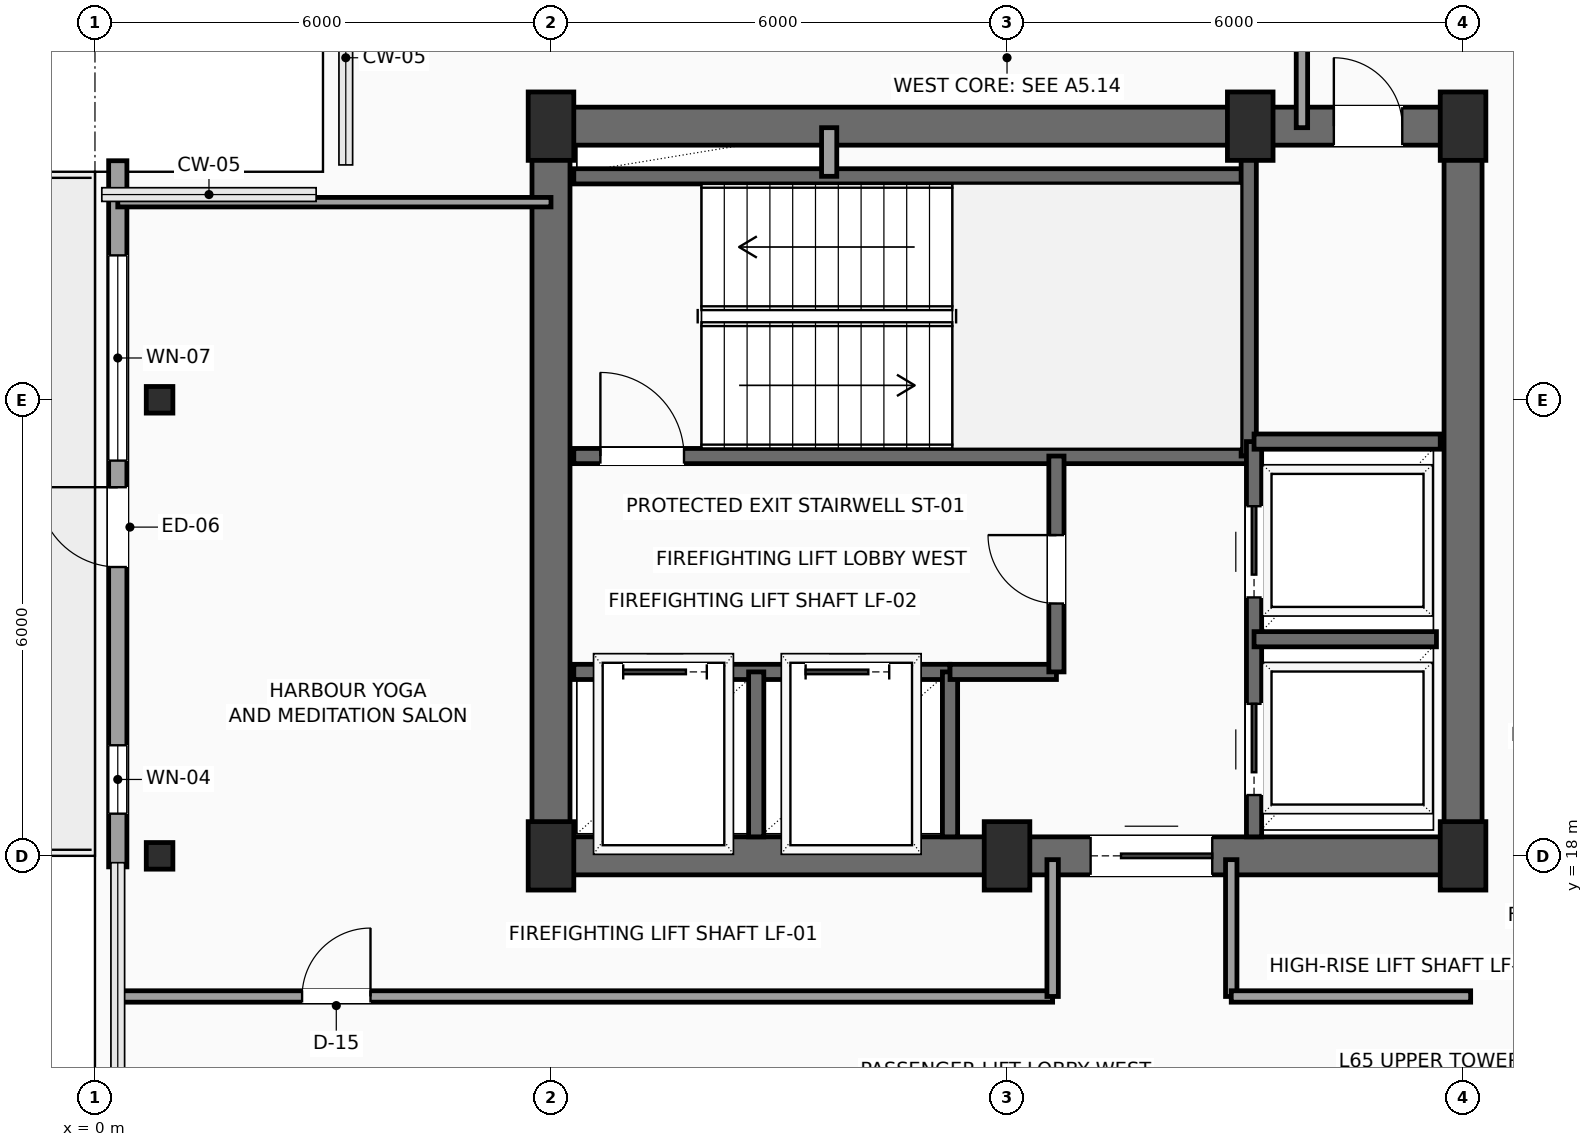
"""IFC4 building model, lengths in metres.
Left out: names, types, materials, properties, quantities, classifications, styles, units other than length and angle.
Written with IfcOpenShell. Run it as: python <this file> out.ifc"""

import sys

from ifc_helpers import new_model, si_unit, direction, frame, frame_2d, origin, origin_2d, place, context, subcontext, project, spatial, rectangle, hollow_rectangle, extrude, element, fill, save


model = new_model("IFC4")
c1 = context("Model", 3, precision=1e-05, world=origin(), true_north=direction((0.0, 1.0)))
c2 = subcontext(c1, "Body", "Model", "MODEL_VIEW")
j1 = project(units=[si_unit("LENGTHUNIT", "METRE"), si_unit("PLANEANGLEUNIT", "RADIAN")], contexts=[c1])
p1 = place(None, origin())
s1 = spatial("IfcSite", under=j1, at=p1, CompositionType="ELEMENT")
p2 = place(p1, origin())
s2 = spatial("IfcBuilding", under=s1, at=p2, CompositionType="ELEMENT")
p3 = place(p2, frame((0.0, 0.0, 260.7)))
s3 = spatial("IfcBuildingStorey", under=s2, at=p3, CompositionType="ELEMENT", Elevation=260.7)
for number, where, z_axis, x_axis in (
    (1, (6.0, 18.0, 0.0), (0.0, 0.0, 1.0), (1.0, 0.0, 0.0)),
    (2, (12.0, 18.0, 0.0), (0.0, 0.0, 1.0), (1.0, 0.0, 0.0)),
    (3, (18.0, 18.0, 0.0), (0.0, 0.0, 1.0), (1.0, 0.0, 0.0)),
    (4, (6.0, 27.6, 0.0), (0.0, 0.0, 1.0), (1.0, 0.0, 0.0)),
    (5, (15.2, 27.6, 0.0), (0.0, 0.0, 1.0), (1.0, 0.0, 0.0)),
    (6, (18.0, 27.6, 0.0), (0.0, 0.0, 1.0), (1.0, 0.0, 0.0)),
):
    element("IfcColumn", number, at=place(p3, frame(where, z_axis=z_axis, x_axis=x_axis)), inside=s3, PredefinedType="COLUMN", context=c2, shape_type="SweptSolid", body=[
        extrude(rectangle(XDim=0.6, YDim=0.9, at=origin_2d()), origin(), (0.0, 0.0, 1.0), 3.5),
    ])
for number, where, z_axis, x_axis in (
    (7, (0.85, 18.0, 0.0), (0.0, 0.0, 1.0), (1.0, 0.0, 0.0)),
    (8, (0.85, 24.0, 0.0), (0.0, 0.0, 1.0), (1.0, 0.0, 0.0)),
):
    element("IfcColumn", number, at=place(p3, frame(where, z_axis=z_axis, x_axis=x_axis)), inside=s3, PredefinedType="COLUMN", context=c2, shape_type="SweptSolid", body=[
        extrude(hollow_rectangle(XDim=0.35, YDim=0.35, WallThickness=0.016, InnerFilletRadius=0.016, OuterFilletRadius=0.032, at=origin_2d()), origin(), (0.0, 0.0, 1.0), 3.5),
    ])
p4 = place(p3, frame((0.3, 17.855, 0.0), z_axis=(0.0, 0.0, 1.0), x_axis=(0.0, 1.0, 0.0)))
e9 = element("IfcWall", 9, at=p4, inside=s3, PredefinedType="SOLIDWALL", context=c2, shape_type="SweptSolid", body=[
    extrude(rectangle(XDim=9.29, YDim=0.24, at=frame_2d((4.645, 0.0))), origin(), (0.0, 0.0, 1.0), 3.3),
])
p5 = place(p4, frame((3.945, 0.0, 0.0)))
e10 = element("IfcOpeningElement", 10, at=p5, cuts=e9, PredefinedType="OPENING", context=c2, shape_type="SweptSolid", body=[
    extrude(rectangle(XDim=1.05, YDim=2.2, at=frame_2d((0.525, 1.1))), frame((0.0, 0.13, 0.0), z_axis=(0.0, -1.0, 0.0), x_axis=(1.0, 0.0, 0.0)), (0.0, 0.0, 1.0), 0.26),
])
p6 = place(p4, frame((5.345, 0.0, 0.6)))
e11 = element("IfcOpeningElement", 11, at=p6, cuts=e9, PredefinedType="OPENING", context=c2, shape_type="SweptSolid", body=[
    extrude(rectangle(XDim=2.7, YDim=2.3, at=frame_2d((1.35, 1.15))), frame((0.0, 0.13, 0.0), z_axis=(0.0, -1.0, 0.0), x_axis=(1.0, 0.0, 0.0)), (0.0, 0.0, 1.0), 0.26),
])
p7 = place(p4, frame((0.7, 0.0, 0.6)))
e12 = element("IfcOpeningElement", 12, at=p7, cuts=e9, PredefinedType="OPENING", context=c2, shape_type="SweptSolid", body=[
    extrude(rectangle(XDim=0.9, YDim=2.2, at=frame_2d((0.45, 1.1))), frame((0.0, 0.13, 0.0), z_axis=(0.0, -1.0, 0.0), x_axis=(1.0, 0.0, 0.0)), (0.0, 0.0, 1.0), 0.26),
])
p8 = place(p3, frame((6.0, 18.0, 0.0), z_axis=(0.0, 0.0, 1.0), x_axis=(1.0, 0.0, 0.0)))
e13 = element("IfcWall", 13, at=p8, inside=s3, PredefinedType="SHEAR", context=c2, shape_type="SweptSolid", body=[
    extrude(rectangle(XDim=12.0, YDim=0.5, at=frame_2d((6.0, 0.0))), origin(), (0.0, 0.0, 1.0), 3.3),
])
p9 = place(p8, frame((7.1, 0.0, 0.0)))
e14 = element("IfcOpeningElement", 14, at=p9, cuts=e13, PredefinedType="OPENING", context=c2, shape_type="SweptSolid", body=[
    extrude(rectangle(XDim=1.6, YDim=2.3, at=frame_2d((0.8, 1.15))), frame((0.0, 0.26, 0.0), z_axis=(0.0, -1.0, 0.0), x_axis=(1.0, 0.0, 0.0)), (0.0, 0.0, 1.0), 0.52),
])
p10 = place(p3, frame((6.0, 27.6, 0.0), z_axis=(0.0, 0.0, 1.0), x_axis=(1.0, 0.0, 0.0)))
e15 = element("IfcWall", 15, at=p10, inside=s3, PredefinedType="SHEAR", context=c2, shape_type="SweptSolid", body=[
    extrude(rectangle(XDim=12.0, YDim=0.5, at=frame_2d((6.0, 0.0))), origin(), (0.0, 0.0, 1.0), 3.3),
])
p11 = place(p10, frame((10.3, 0.0, 0.0)))
e16 = element("IfcOpeningElement", 16, at=p11, cuts=e15, PredefinedType="OPENING", context=c2, shape_type="SweptSolid", body=[
    extrude(rectangle(XDim=0.9, YDim=2.15, at=frame_2d((0.45, 1.075))), frame((0.0, 0.26, 0.0), z_axis=(0.0, -1.0, 0.0), x_axis=(1.0, 0.0, 0.0)), (0.0, 0.0, 1.0), 0.52),
])
for number, where, z_axis, x_axis in (
    (17, (6.0, 18.0, 0.0), (0.0, 0.0, 1.0), (0.0, 1.0, 0.0)),
    (18, (18.0, 18.0, 0.0), (0.0, 0.0, 1.0), (0.0, 1.0, 0.0)),
):
    element("IfcWall", number, at=place(p3, frame(where, z_axis=z_axis, x_axis=x_axis)), inside=s3, PredefinedType="SHEAR", context=c2, shape_type="SweptSolid", body=[
        extrude(rectangle(XDim=9.6, YDim=0.5, at=frame_2d((4.8, 0.0))), origin(), (0.0, 0.0, 1.0), 3.3),
    ])
p12 = place(p3, frame((6.3, 23.26, 0.0), z_axis=(0.0, 0.0, 1.0), x_axis=(1.0, 0.0, 0.0)))
e19 = element("IfcWall", 19, at=p12, inside=s3, PredefinedType="SHEAR", context=c2, shape_type="SweptSolid", body=[
    extrude(rectangle(XDim=8.88, YDim=0.2, at=frame_2d((4.44, 0.0))), origin(), (0.0, 0.0, 1.0), 3.3),
])
p13 = place(p12, frame((0.35, 0.0, 0.0)))
e20 = element("IfcOpeningElement", 20, at=p13, cuts=e19, PredefinedType="OPENING", context=c2, shape_type="SweptSolid", body=[
    extrude(rectangle(XDim=1.1, YDim=2.2, at=frame_2d((0.55, 1.1))), frame((0.0, 0.11, 0.0), z_axis=(0.0, -1.0, 0.0), x_axis=(1.0, 0.0, 0.0)), (0.0, 0.0, 1.0), 0.22),
])
p14 = place(p3, frame((6.3, 26.94, 0.0), z_axis=(0.0, 0.0, 1.0), x_axis=(1.0, 0.0, 0.0)))
e21 = element("IfcWall", 21, at=p14, inside=s3, PredefinedType="SHEAR", context=c2, shape_type="SweptSolid", body=[
    extrude(rectangle(XDim=8.88, YDim=0.2, at=frame_2d((4.44, 0.0))), origin(), (0.0, 0.0, 1.0), 3.3),
])
p15 = place(p3, frame((15.18, 23.26, 0.0), z_axis=(0.0, 0.0, 1.0), x_axis=(0.0, 1.0, 0.0)))
e22 = element("IfcWall", 22, at=p15, inside=s3, PredefinedType="SHEAR", context=c2, shape_type="SweptSolid", body=[
    extrude(rectangle(XDim=4.04, YDim=0.2, at=frame_2d((2.02, 0.0))), origin(), (0.0, 0.0, 1.0), 3.3),
])
p16 = place(p3, frame((6.3, 20.42, 0.0), z_axis=(0.0, 0.0, 1.0), x_axis=(1.0, 0.0, 0.0)))
e23 = element("IfcWall", 23, at=p16, inside=s3, PredefinedType="SHEAR", context=c2, shape_type="SweptSolid", body=[
    extrude(rectangle(XDim=4.95, YDim=0.2, at=frame_2d((2.475, 0.0))), origin(), (0.0, 0.0, 1.0), 3.3),
])
p17 = place(p16, frame((0.65, 0.0, 0.0)))
e24 = element("IfcOpeningElement", 24, at=p17, cuts=e23, PredefinedType="OPENING", context=c2, shape_type="SweptSolid", body=[
    extrude(rectangle(XDim=1.1, YDim=2.2, at=frame_2d((0.55, 1.1))), frame((0.0, 0.11, 0.0), z_axis=(0.0, -1.0, 0.0), x_axis=(1.0, 0.0, 0.0)), (0.0, 0.0, 1.0), 0.22),
])
p18 = place(p16, frame((3.05, 0.0, 0.0)))
e25 = element("IfcOpeningElement", 25, at=p18, cuts=e23, PredefinedType="OPENING", context=c2, shape_type="SweptSolid", body=[
    extrude(rectangle(XDim=1.1, YDim=2.2, at=frame_2d((0.55, 1.1))), frame((0.0, 0.11, 0.0), z_axis=(0.0, -1.0, 0.0), x_axis=(1.0, 0.0, 0.0)), (0.0, 0.0, 1.0), 0.22),
])
for number, where, z_axis, x_axis in (
    (26, (8.7, 18.25, 0.0), (0.0, 0.0, 1.0), (0.0, 1.0, 0.0)),
    (27, (11.25, 18.25, 0.0), (0.0, 0.0, 1.0), (0.0, 1.0, 0.0)),
):
    element("IfcWall", number, at=place(p3, frame(where, z_axis=z_axis, x_axis=x_axis)), inside=s3, PredefinedType="SHEAR", context=c2, shape_type="SweptSolid", body=[
        extrude(rectangle(XDim=2.17, YDim=0.2, at=frame_2d((1.085, 0.0))), origin(), (0.0, 0.0, 1.0), 3.3),
    ])
p19 = place(p3, frame((11.25, 20.42, 0.0), z_axis=(0.0, 0.0, 1.0), x_axis=(1.0, 0.0, 0.0)))
e28 = element("IfcWall", 28, at=p19, inside=s3, PredefinedType="SHEAR", context=c2, shape_type="SweptSolid", body=[
    extrude(rectangle(XDim=1.4, YDim=0.2, at=frame_2d((0.7, 0.0))), origin(), (0.0, 0.0, 1.0), 3.3),
])
p20 = place(p3, frame((12.65, 20.42, 0.0), z_axis=(0.0, 0.0, 1.0), x_axis=(0.0, 1.0, 0.0)))
e29 = element("IfcWall", 29, at=p20, inside=s3, PredefinedType="SHEAR", context=c2, shape_type="SweptSolid", body=[
    extrude(rectangle(XDim=2.84, YDim=0.2, at=frame_2d((1.42, 0.0))), origin(), (0.0, 0.0, 1.0), 3.3),
])
p21 = place(p20, frame((0.9, 0.0, 0.0)))
e30 = element("IfcOpeningElement", 30, at=p21, cuts=e29, PredefinedType="OPENING", context=c2, shape_type="SweptSolid", body=[
    extrude(rectangle(XDim=0.9, YDim=2.15, at=frame_2d((0.45, 1.075))), frame((0.0, 0.11, 0.0), z_axis=(0.0, -1.0, 0.0), x_axis=(1.0, 0.0, 0.0)), (0.0, 0.0, 1.0), 0.22),
])
p22 = place(p3, frame((9.66, 26.94, 0.0), z_axis=(0.0, 0.0, 1.0), x_axis=(0.0, 1.0, 0.0)))
e31 = element("IfcWall", 31, at=p22, inside=s3, PredefinedType="SOLIDWALL", context=c2, shape_type="SweptSolid", body=[
    extrude(rectangle(XDim=0.64, YDim=0.2, at=frame_2d((0.32, 0.0))), origin(), (0.0, 0.0, 1.0), 3.3),
])
p23 = place(p3, frame((15.25, 18.25, 0.0), z_axis=(0.0, 0.0, 1.0), x_axis=(0.0, 1.0, 0.0)))
e32 = element("IfcWall", 32, at=p23, inside=s3, PredefinedType="SHEAR", context=c2, shape_type="SweptSolid", body=[
    extrude(rectangle(XDim=5.2, YDim=0.2, at=frame_2d((2.6, 0.0))), origin(), (0.0, 0.0, 1.0), 3.3),
])
p24 = place(p23, frame((0.55, 0.0, 0.0)))
e33 = element("IfcOpeningElement", 33, at=p24, cuts=e32, PredefinedType="OPENING", context=c2, shape_type="SweptSolid", body=[
    extrude(rectangle(XDim=1.2, YDim=2.2, at=frame_2d((0.6, 1.1))), frame((0.0, 0.11, 0.0), z_axis=(0.0, -1.0, 0.0), x_axis=(1.0, 0.0, 0.0)), (0.0, 0.0, 1.0), 0.22),
])
p25 = place(p23, frame((3.15, 0.0, 0.0)))
e34 = element("IfcOpeningElement", 34, at=p25, cuts=e32, PredefinedType="OPENING", context=c2, shape_type="SweptSolid", body=[
    extrude(rectangle(XDim=1.2, YDim=2.2, at=frame_2d((0.6, 1.1))), frame((0.0, 0.11, 0.0), z_axis=(0.0, -1.0, 0.0), x_axis=(1.0, 0.0, 0.0)), (0.0, 0.0, 1.0), 0.22),
])
p26 = place(p3, frame((15.25, 20.85, 0.0), z_axis=(0.0, 0.0, 1.0), x_axis=(1.0, 0.0, 0.0)))
e35 = element("IfcWall", 35, at=p26, inside=s3, PredefinedType="SHEAR", context=c2, shape_type="SweptSolid", body=[
    extrude(rectangle(XDim=2.4, YDim=0.2, at=frame_2d((1.2, 0.0))), origin(), (0.0, 0.0, 1.0), 3.3),
])
p27 = place(p3, frame((15.25, 23.45, 0.0), z_axis=(0.0, 0.0, 1.0), x_axis=(1.0, 0.0, 0.0)))
e36 = element("IfcWall", 36, at=p27, inside=s3, PredefinedType="SHEAR", context=c2, shape_type="SweptSolid", body=[
    extrude(rectangle(XDim=2.45, YDim=0.2, at=frame_2d((1.225, 0.0))), origin(), (0.0, 0.0, 1.0), 3.3),
])
p28 = place(p3, frame((0.3, 16.15, 0.0), z_axis=(0.0, 0.0, 1.0), x_axis=(1.0, 0.0, 0.0)))
e37 = element("IfcWall", 37, at=p28, inside=s3, PredefinedType="PARTITIONING", context=c2, shape_type="SweptSolid", body=[
    extrude(rectangle(XDim=12.3, YDim=0.15, at=frame_2d((6.15, 0.0))), origin(), (0.0, 0.0, 1.0), 3.3),
])
p29 = place(p28, frame((2.425, 0.0, 0.0)))
e38 = element("IfcOpeningElement", 38, at=p29, cuts=e37, PredefinedType="OPENING", context=c2, shape_type="SweptSolid", body=[
    extrude(rectangle(XDim=0.9, YDim=2.1, at=frame_2d((0.45, 1.05))), frame((0.0, 0.085, 0.0), z_axis=(0.0, -1.0, 0.0), x_axis=(1.0, 0.0, 0.0)), (0.0, 0.0, 1.0), 0.17),
])
for number, where, z_axis, x_axis in (
    (39, (12.6, 16.15, 0.0), (0.0, 0.0, 1.0), (0.0, 1.0, 0.0)),
    (40, (14.95, 17.95, 0.0), (0.0, 0.0, 1.0), (0.0, -1.0, 0.0)),
):
    element("IfcWall", number, at=place(p3, frame(where, z_axis=z_axis, x_axis=x_axis)), inside=s3, PredefinedType="PARTITIONING", context=c2, shape_type="SweptSolid", body=[
        extrude(rectangle(XDim=1.8, YDim=0.15, at=frame_2d((0.9, 0.0))), origin(), (0.0, 0.0, 1.0), 3.3),
    ])
p30 = place(p3, frame((14.95, 16.15, 0.0), z_axis=(0.0, 0.0, 1.0), x_axis=(1.0, 0.0, 0.0)))
e41 = element("IfcWall", 41, at=p30, inside=s3, PredefinedType="PARTITIONING", context=c2, shape_type="SweptSolid", body=[
    extrude(rectangle(XDim=3.15, YDim=0.15, at=frame_2d((1.575, 0.0))), origin(), (0.0, 0.0, 1.0), 3.3),
])
p31 = place(p3, frame((15.88, 27.58, 0.0), z_axis=(0.0, 0.0, 1.0), x_axis=(0.0, 1.0, 0.0)))
e42 = element("IfcWall", 42, at=p31, inside=s3, PredefinedType="PARTITIONING", context=c2, shape_type="SweptSolid", body=[
    extrude(rectangle(XDim=2.12, YDim=0.15, at=frame_2d((1.06, 0.0))), origin(), (0.0, 0.0, 1.0), 3.3),
])
p32 = place(p3, frame((0.3, 26.6, 0.0), z_axis=(0.0, 0.0, 1.0), x_axis=(1.0, 0.0, 0.0)))
e43 = element("IfcWall", 43, at=p32, inside=s3, PredefinedType="PARTITIONING", context=c2, shape_type="SweptSolid", body=[
    extrude(rectangle(XDim=5.7, YDim=0.125, at=frame_2d((2.85, 0.0))), origin(), (0.0, 0.0, 1.0), 3.3),
])
p33 = place(p5, origin())
e44 = element("IfcDoor", 44, at=p33, inside=s3, OperationType="SINGLE_SWING_RIGHT", PredefinedType="DOOR", context=c2, shape_type="SweptSolid", body=[
    extrude(rectangle(XDim=1.05, YDim=2.2, at=frame_2d((0.525, 1.1))), frame((0.0, 0.025, 0.0), z_axis=(0.0, -1.0, 0.0), x_axis=(1.0, 0.0, 0.0)), (0.0, 0.0, 1.0), 0.05),
])
fill(e10, e44)
p34 = place(p6, origin())
e45 = element("IfcWindow", 45, at=p34, inside=s3, PartitioningType="SINGLE_PANEL", PredefinedType="WINDOW", context=c2, shape_type="SweptSolid", body=[
    extrude(rectangle(XDim=2.7, YDim=2.3, at=frame_2d((1.35, 1.15))), frame((0.0, 0.03, 0.0), z_axis=(0.0, -1.0, 0.0), x_axis=(1.0, 0.0, 0.0)), (0.0, 0.0, 1.0), 0.06),
])
fill(e11, e45)
p35 = place(p7, origin())
e46 = element("IfcWindow", 46, at=p35, inside=s3, PartitioningType="SINGLE_PANEL", PredefinedType="WINDOW", context=c2, shape_type="SweptSolid", body=[
    extrude(rectangle(XDim=0.9, YDim=2.2, at=frame_2d((0.45, 1.1))), frame((0.0, 0.03, 0.0), z_axis=(0.0, -1.0, 0.0), x_axis=(1.0, 0.0, 0.0)), (0.0, 0.0, 1.0), 0.06),
])
fill(e12, e46)
p36 = place(p9, origin())
e47 = element("IfcDoor", 47, at=p36, inside=s3, OperationType="DOUBLE_DOOR_SLIDING", PredefinedType="DOOR", context=c2, shape_type="SweptSolid", body=[
    extrude(rectangle(XDim=1.6, YDim=2.3, at=frame_2d((0.8, 1.15))), frame((0.0, 0.025, 0.0), z_axis=(0.0, -1.0, 0.0), x_axis=(1.0, 0.0, 0.0)), (0.0, 0.0, 1.0), 0.05),
])
fill(e14, e47)
p37 = place(p11, origin())
e48 = element("IfcDoor", 48, at=p37, inside=s3, OperationType="SINGLE_SWING_LEFT", PredefinedType="DOOR", context=c2, shape_type="SweptSolid", body=[
    extrude(rectangle(XDim=0.9, YDim=2.15, at=frame_2d((0.45, 1.075))), frame((0.0, 0.025, 0.0), z_axis=(0.0, -1.0, 0.0), x_axis=(1.0, 0.0, 0.0)), (0.0, 0.0, 1.0), 0.05),
])
fill(e16, e48)
p38 = place(p13, origin())
e49 = element("IfcDoor", 49, at=p38, inside=s3, OperationType="SINGLE_SWING_LEFT", PredefinedType="DOOR", context=c2, shape_type="SweptSolid", body=[
    extrude(rectangle(XDim=1.1, YDim=2.2, at=frame_2d((0.55, 1.1))), frame((0.0, 0.025, 0.0), z_axis=(0.0, -1.0, 0.0), x_axis=(1.0, 0.0, 0.0)), (0.0, 0.0, 1.0), 0.05),
])
fill(e20, e49)
p39 = place(p17, origin())
e50 = element("IfcDoor", 50, at=p39, inside=s3, OperationType="SLIDING_TO_LEFT", PredefinedType="DOOR", context=c2, shape_type="SweptSolid", body=[
    extrude(rectangle(XDim=1.1, YDim=2.2, at=frame_2d((0.55, 1.1))), frame((0.0, 0.025, 0.0), z_axis=(0.0, -1.0, 0.0), x_axis=(1.0, 0.0, 0.0)), (0.0, 0.0, 1.0), 0.05),
])
fill(e24, e50)
p40 = place(p18, origin())
e51 = element("IfcDoor", 51, at=p40, inside=s3, OperationType="SLIDING_TO_LEFT", PredefinedType="DOOR", context=c2, shape_type="SweptSolid", body=[
    extrude(rectangle(XDim=1.1, YDim=2.2, at=frame_2d((0.55, 1.1))), frame((0.0, 0.025, 0.0), z_axis=(0.0, -1.0, 0.0), x_axis=(1.0, 0.0, 0.0)), (0.0, 0.0, 1.0), 0.05),
])
fill(e25, e51)
p41 = place(p21, origin())
e52 = element("IfcDoor", 52, at=p41, inside=s3, OperationType="SINGLE_SWING_RIGHT", PredefinedType="DOOR", context=c2, shape_type="SweptSolid", body=[
    extrude(rectangle(XDim=0.9, YDim=2.15, at=frame_2d((0.45, 1.075))), frame((0.0, 0.025, 0.0), z_axis=(0.0, -1.0, 0.0), x_axis=(1.0, 0.0, 0.0)), (0.0, 0.0, 1.0), 0.05),
])
fill(e30, e52)
p42 = place(p24, origin())
e53 = element("IfcDoor", 53, at=p42, inside=s3, OperationType="SLIDING_TO_RIGHT", PredefinedType="DOOR", context=c2, shape_type="SweptSolid", body=[
    extrude(rectangle(XDim=1.2, YDim=2.2, at=frame_2d((0.6, 1.1))), frame((0.0, 0.025, 0.0), z_axis=(0.0, -1.0, 0.0), x_axis=(1.0, 0.0, 0.0)), (0.0, 0.0, 1.0), 0.05),
])
fill(e33, e53)
p43 = place(p25, origin())
e54 = element("IfcDoor", 54, at=p43, inside=s3, OperationType="SLIDING_TO_RIGHT", PredefinedType="DOOR", context=c2, shape_type="SweptSolid", body=[
    extrude(rectangle(XDim=1.2, YDim=2.2, at=frame_2d((0.6, 1.1))), frame((0.0, 0.025, 0.0), z_axis=(0.0, -1.0, 0.0), x_axis=(1.0, 0.0, 0.0)), (0.0, 0.0, 1.0), 0.05),
])
fill(e34, e54)
p44 = place(p29, origin())
e55 = element("IfcDoor", 55, at=p44, inside=s3, OperationType="SINGLE_SWING_RIGHT", PredefinedType="DOOR", context=c2, shape_type="SweptSolid", body=[
    extrude(rectangle(XDim=0.9, YDim=2.1, at=frame_2d((0.45, 1.05))), frame((0.0, 0.025, 0.0), z_axis=(0.0, -1.0, 0.0), x_axis=(1.0, 0.0, 0.0)), (0.0, 0.0, 1.0), 0.05),
])
fill(e38, e55)
save(model, sys.argv[1])
